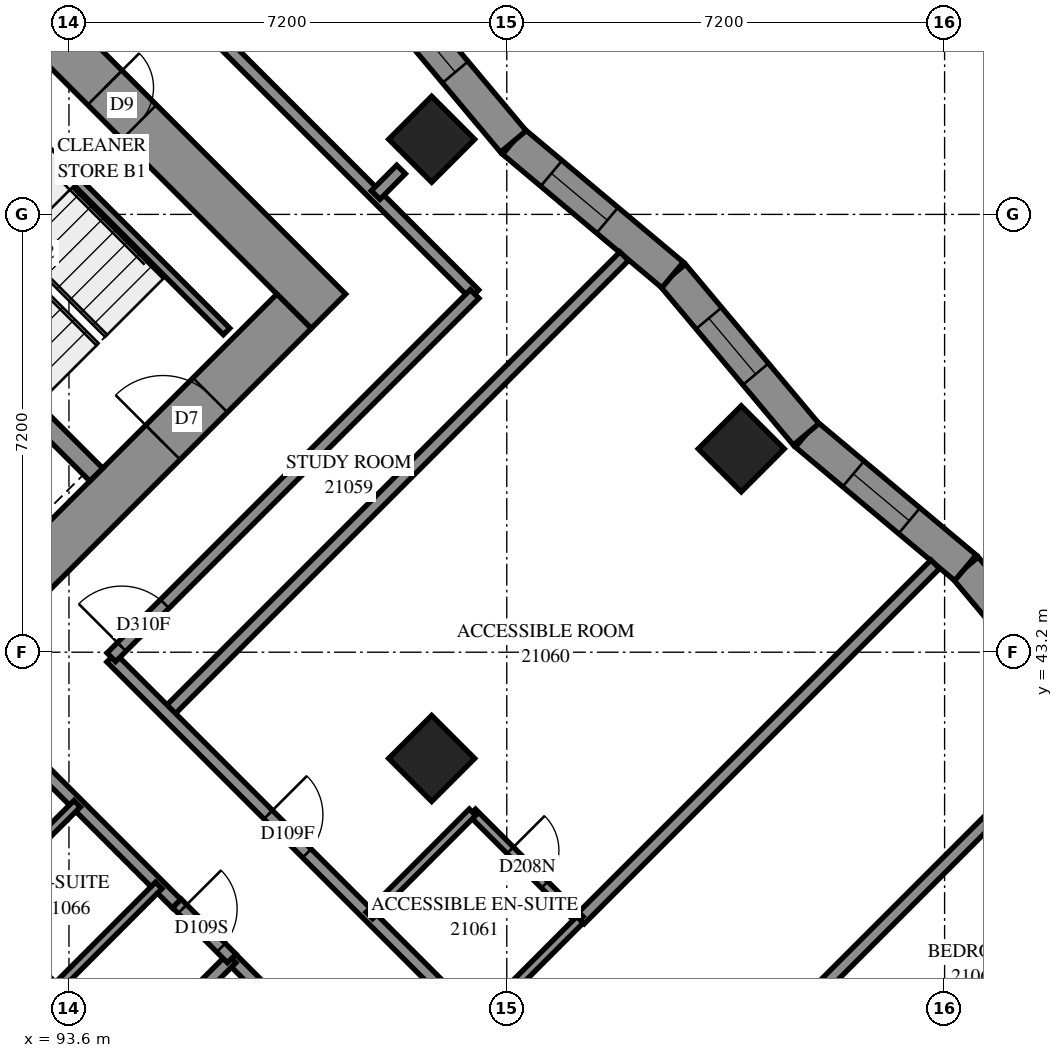
"""IFC4 building model, lengths in metres.
Left out: names, types, materials, properties, quantities, classifications, styles, units other than length and angle.
Written with IfcOpenShell. Run it as: python <this file> out.ifc"""

import sys

from ifc_helpers import new_model, si_unit, direction, frame, frame_2d, origin, origin_2d, place, context, subcontext, project, spatial, polyline, rectangle, outline, extrude, element, fill, save


model = new_model("IFC4")
c1 = context("Model", 3, precision=1e-05, world=origin(), true_north=direction((0.0, 1.0)))
c2 = subcontext(c1, "Body", "Model", "MODEL_VIEW")
j1 = project(units=[si_unit("LENGTHUNIT", "METRE"), si_unit("PLANEANGLEUNIT", "RADIAN")], contexts=[c1])
p1 = place(None, origin())
s1 = spatial("IfcSite", under=j1, at=p1, CompositionType="ELEMENT")
p2 = place(p1, origin())
s2 = spatial("IfcBuilding", under=s1, at=p2, CompositionType="ELEMENT")
p3 = place(p2, frame((0.0, 0.0, 81.2)))
s3 = spatial("IfcBuildingStorey", under=s2, at=p3, CompositionType="ELEMENT", Elevation=81.2)
for number, where, z_axis, x_axis in (
    (1, (99.565, 51.635, 0.0), (0.0, 0.0, 1.0), (0.707, -0.707, 0.0)),
    (2, (104.656, 46.544, 0.0), (0.0, 0.0, 1.0), (0.707, -0.707, 0.0)),
    (3, (99.565, 41.453, 0.0), (0.0, 0.0, 1.0), (0.707, -0.707, 0.0)),
):
    element("IfcColumn", number, at=place(p3, frame(where, z_axis=z_axis, x_axis=x_axis)), inside=s3, PredefinedType="COLUMN", context=c2, shape_type="SweptSolid", body=[
        extrude(rectangle(XDim=1.0, YDim=1.0, at=origin_2d()), origin(), (0.0, 0.0, 1.0), 3.1),
    ])
p4 = place(p3, frame((86.554, 60.121, -0.3), z_axis=(0.0, 0.0, 1.0), x_axis=(0.7071067812, -0.7071067812, 0.0)))
e4 = element("IfcWall", 4, at=p4, inside=s3, PredefinedType="SHEAR", context=c2, shape_type="SweptSolid", body=[
    extrude(rectangle(XDim=16.0, YDim=0.8, at=frame_2d((8.0, 0.0))), origin(), (0.0, 0.0, 1.0), 2.7),
])
p5 = place(p4, frame((10.8, 0.0, 0.3)))
e5 = element("IfcOpeningElement", 5, at=p5, cuts=e4, PredefinedType="OPENING", context=c2, shape_type="SweptSolid", body=[
    extrude(rectangle(XDim=0.8, YDim=2.1, at=frame_2d((0.4, 1.05))), frame((0.0, 0.41, 0.0), z_axis=(0.0, -1.0, 0.0), x_axis=(1.0, 0.0, 0.0)), (0.0, 0.0, 1.0), 0.82),
])
p6 = place(p3, frame((87.12, 38.625, -0.3), z_axis=(0.0, 0.0, 1.0), x_axis=(0.7071067812, 0.7071067812, 0.0)))
e6 = element("IfcWall", 6, at=p6, inside=s3, PredefinedType="SHEAR", context=c2, shape_type="SweptSolid", body=[
    extrude(rectangle(XDim=14.4, YDim=0.8, at=frame_2d((7.2, 0.0))), origin(), (0.0, 0.0, 1.0), 2.7),
])
p7 = place(p6, frame((4.55, 0.0, 0.3)))
e7 = element("IfcOpeningElement", 7, at=p7, cuts=e6, PredefinedType="OPENING", context=c2, shape_type="SweptSolid", body=[
    extrude(rectangle(XDim=1.1, YDim=2.1, at=frame_2d((0.55, 1.05))), frame((0.0, 0.41, 0.0), z_axis=(0.0, -1.0, 0.0), x_axis=(1.0, 0.0, 0.0)), (0.0, 0.0, 1.0), 0.82),
])
p8 = place(p6, frame((11.35, 0.0, 0.3)))
e8 = element("IfcOpeningElement", 8, at=p8, cuts=e6, PredefinedType="OPENING", context=c2, shape_type="SweptSolid", body=[
    extrude(rectangle(XDim=1.1, YDim=2.1, at=frame_2d((0.55, 1.05))), frame((0.0, 0.41, 0.0), z_axis=(0.0, -1.0, 0.0), x_axis=(1.0, 0.0, 0.0)), (0.0, 0.0, 1.0), 0.82),
])
p9 = place(p3, frame((88.958, 51.211, 0.0), z_axis=(0.0, 0.0, 1.0), x_axis=(0.7070998367, -0.7071137256, 0.0)))
e9 = element("IfcWall", 9, at=p9, inside=s3, PredefinedType="SOLIDWALL", context=c2, shape_type="SweptSolid", body=[
    extrude(rectangle(XDim=7.2, YDim=0.3, at=frame_2d((3.6, 0.0))), origin(), (0.0, 0.0, 1.0), 3.1),
])
p10 = place(p3, frame((110.553, 41.95, 0.0), z_axis=(0.0, 0.0, 1.0), x_axis=(-0.6423052098, 0.766448966, 0.0)))
e10 = element("IfcWall", 10, at=p10, inside=s3, PredefinedType="SOLIDWALL", context=c2, shape_type="SweptSolid", body=[
    extrude(outline(polyline([(0.048, -0.275), (3.466, -0.275), (3.418, 0.275), (-0.048, 0.275), (0.048, -0.275)])), origin(), (0.0, 0.0, 1.0), 3.1),
])
p11 = place(p10, frame((1.109, 0.0, 0.5)))
e11 = element("IfcOpeningElement", 11, at=p11, cuts=e10, PredefinedType="OPENING", context=c2, shape_type="SweptSolid", body=[
    extrude(rectangle(XDim=1.2, YDim=2.45, at=frame_2d((0.6, 1.225))), frame((0.0, 0.285, 0.0), z_axis=(0.0, -1.0, 0.0), x_axis=(1.0, 0.0, 0.0)), (0.0, 0.0, 1.0), 0.57),
])
p12 = place(p3, frame((108.343, 44.588, 0.0), z_axis=(0.0, 0.0, 1.0), x_axis=(-0.7664414628, 0.6423141631, 0.0)))
e12 = element("IfcWall", 12, at=p12, inside=s3, PredefinedType="SOLIDWALL", context=c2, shape_type="SweptSolid", body=[
    extrude(outline(polyline([(-0.024, -0.275), (3.394, -0.275), (3.442, 0.275), (0.024, 0.275), (-0.024, -0.275)])), origin(), (0.0, 0.0, 1.0), 3.1),
])
p13 = place(p12, frame((1.205, 0.0, 0.5)))
e13 = element("IfcOpeningElement", 13, at=p13, cuts=e12, PredefinedType="OPENING", context=c2, shape_type="SweptSolid", body=[
    extrude(rectangle(XDim=1.2, YDim=2.45, at=frame_2d((0.6, 1.225))), frame((0.0, 0.285, 0.0), z_axis=(0.0, -1.0, 0.0), x_axis=(1.0, 0.0, 0.0)), (0.0, 0.0, 1.0), 0.57),
])
p14 = place(p3, frame((105.723, 46.784, 0.0), z_axis=(0.0, 0.0, 1.0), x_axis=(-0.6423113798, 0.7664437954, 0.0)))
e14 = element("IfcWall", 14, at=p14, inside=s3, PredefinedType="SOLIDWALL", context=c2, shape_type="SweptSolid", body=[
    extrude(outline(polyline([(0.024, -0.275), (3.442, -0.275), (3.394, 0.275), (-0.024, 0.275), (0.024, -0.275)])), origin(), (0.0, 0.0, 1.0), 3.1),
])
p15 = place(p14, frame((1.291, 0.0, 0.5)))
e15 = element("IfcOpeningElement", 15, at=p15, cuts=e14, PredefinedType="OPENING", context=c2, shape_type="SweptSolid", body=[
    extrude(rectangle(XDim=1.2, YDim=2.45, at=frame_2d((0.6, 1.225))), frame((0.0, 0.285, 0.0), z_axis=(0.0, -1.0, 0.0), x_axis=(1.0, 0.0, 0.0)), (0.0, 0.0, 1.0), 0.57),
])
p16 = place(p3, frame((103.527, 49.404, 0.0), z_axis=(0.0, 0.0, 1.0), x_axis=(-0.7664293929, 0.6423285652, 0.0)))
e16 = element("IfcWall", 16, at=p16, inside=s3, PredefinedType="SOLIDWALL", context=c2, shape_type="SweptSolid", body=[
    extrude(outline(polyline([(-0.024, -0.275), (3.394, -0.275), (3.442, 0.275), (0.024, 0.275), (-0.024, -0.275)])), origin(), (0.0, 0.0, 1.0), 3.1),
])
p17 = place(p16, frame((1.401, 0.0, 0.5)))
e17 = element("IfcOpeningElement", 17, at=p17, cuts=e16, PredefinedType="OPENING", context=c2, shape_type="SweptSolid", body=[
    extrude(rectangle(XDim=1.2, YDim=2.45, at=frame_2d((0.6, 1.225))), frame((0.0, 0.285, 0.0), z_axis=(0.0, -1.0, 0.0), x_axis=(1.0, 0.0, 0.0)), (0.0, 0.0, 1.0), 0.57),
])
p18 = place(p3, frame((100.907, 51.599, 0.0), z_axis=(0.0, 0.0, 1.0), x_axis=(-0.6423285652, 0.7664293929, 0.0)))
e18 = element("IfcWall", 18, at=p18, inside=s3, PredefinedType="SOLIDWALL", context=c2, shape_type="SweptSolid", body=[
    extrude(outline(polyline([(0.024, -0.275), (3.442, -0.275), (3.394, 0.275), (-0.024, 0.275), (0.024, -0.275)])), origin(), (0.0, 0.0, 1.0), 3.1),
])
p19 = place(p18, frame((1.486, 0.0, 0.5)))
e19 = element("IfcOpeningElement", 19, at=p19, cuts=e18, PredefinedType="OPENING", context=c2, shape_type="SweptSolid", body=[
    extrude(rectangle(XDim=1.2, YDim=2.45, at=frame_2d((0.6, 1.225))), frame((0.0, 0.285, 0.0), z_axis=(0.0, -1.0, 0.0), x_axis=(1.0, 0.0, 0.0)), (0.0, 0.0, 1.0), 0.57),
])
p20 = place(p3, frame((91.313, 53.354, 0.0), z_axis=(0.0, 0.0, 1.0), x_axis=(0.7071140275, -0.7070995348, 0.0)))
e20 = element("IfcWall", 20, at=p20, inside=s3, PredefinedType="PARTITIONING", context=c2, shape_type="SweptSolid", body=[
    extrude(rectangle(XDim=6.9, YDim=0.15, at=frame_2d((3.45, 0.0))), origin(), (0.0, 0.0, 1.0), 3.1),
])
p21 = place(p3, frame((87.894, 61.461, 0.0), z_axis=(0.0, 0.0, 1.0), x_axis=(0.7071067812, -0.7071067812, 0.0)))
e21 = element("IfcWall", 21, at=p21, inside=s3, PredefinedType="PARTITIONING", context=c2, shape_type="SweptSolid", body=[
    extrude(rectangle(XDim=17.5, YDim=0.2, at=frame_2d((8.75, 0.0))), origin(), (0.0, 0.0, 1.0), 3.1),
])
p22 = place(p21, frame((8.735, 0.0, 0.0)))
e22 = element("IfcOpeningElement", 22, at=p22, cuts=e21, PredefinedType="OPENING", context=c2, shape_type="SweptSolid", body=[
    extrude(rectangle(XDim=0.9, YDim=2.1, at=frame_2d((0.45, 1.05))), frame((0.0, 0.11, 0.0), z_axis=(0.0, -1.0, 0.0), x_axis=(1.0, 0.0, 0.0)), (0.0, 0.0, 1.0), 0.22),
])
p23 = place(p3, frame((95.215, 42.197, 0.0), z_axis=(0.0, 0.0, 1.0), x_axis=(0.7071114855, 0.7071020769, 0.0)))
e23 = element("IfcWall", 23, at=p23, inside=s3, PredefinedType="PARTITIONING", context=c2, shape_type="SweptSolid", body=[
    extrude(rectangle(XDim=10.629, YDim=0.2, at=frame_2d((5.314, 0.0))), origin(), (0.0, 0.0, 1.0), 3.1),
])
p24 = place(p3, frame((94.294, 43.111, 0.0), z_axis=(0.0, 0.0, 1.0), x_axis=(0.7071067812, -0.7071067812, 0.0)))
e24 = element("IfcWall", 24, at=p24, inside=s3, PredefinedType="PARTITIONING", context=c2, shape_type="SweptSolid", body=[
    extrude(rectangle(XDim=8.499, YDim=0.2, at=frame_2d((4.25, 0.0))), origin(), (0.0, 0.0, 1.0), 3.1),
])
p25 = place(p24, frame((3.651, 0.0, 0.0)))
e25 = element("IfcOpeningElement", 25, at=p25, cuts=e24, PredefinedType="OPENING", context=c2, shape_type="SweptSolid", body=[
    extrude(rectangle(XDim=0.9, YDim=2.1, at=frame_2d((0.45, 1.05))), frame((0.0, 0.11, 0.0), z_axis=(0.0, -1.0, 0.0), x_axis=(1.0, 0.0, 0.0)), (0.0, 0.0, 1.0), 0.22),
])
p26 = place(p3, frame((94.297, 43.117, 0.0), z_axis=(0.0, 0.0, 1.0), x_axis=(0.7071067812, 0.7071067812, 0.0)))
e26 = element("IfcWall", 26, at=p26, inside=s3, PredefinedType="PARTITIONING", context=c2, shape_type="SweptSolid", body=[
    extrude(rectangle(XDim=8.448, YDim=0.2, at=frame_2d((4.224, 0.0))), origin(), (0.0, 0.0, 1.0), 3.1),
])
p27 = place(p26, frame((0.242, 0.0, 0.0)))
e27 = element("IfcOpeningElement", 27, at=p27, cuts=e26, PredefinedType="OPENING", context=c2, shape_type="SweptSolid", body=[
    extrude(rectangle(XDim=1.0, YDim=2.1, at=frame_2d((0.5, 1.05))), frame((0.0, 0.11, 0.0), z_axis=(0.0, -1.0, 0.0), x_axis=(1.0, 0.0, 0.0)), (0.0, 0.0, 1.0), 0.22),
])
p28 = place(p3, frame((102.002, 38.804, 0.0), z_axis=(0.0, 0.0, 1.0), x_axis=(0.7072398927, 0.7069736446, 0.0)))
e28 = element("IfcWall", 28, at=p28, inside=s3, PredefinedType="PARTITIONING", context=c2, shape_type="SweptSolid", body=[
    extrude(rectangle(XDim=8.263, YDim=0.2, at=frame_2d((4.131, 0.0))), origin(), (0.0, 0.0, 1.0), 3.1),
])
p29 = place(p3, frame((105.155, 36.863, 0.0), z_axis=(0.0, 0.0, 1.0), x_axis=(0.7071067812, 0.7071067812, 0.0)))
e29 = element("IfcWall", 29, at=p29, inside=s3, PredefinedType="PARTITIONING", context=c2, shape_type="SweptSolid", body=[
    extrude(rectangle(XDim=5.787, YDim=0.2, at=frame_2d((2.893, 0.0))), origin(), (0.0, 0.0, 1.0), 3.1),
])
p30 = place(p3, frame((92.809, 41.627, 0.0), z_axis=(0.0, 0.0, 1.0), x_axis=(0.7071067812, -0.7071067812, 0.0)))
e30 = element("IfcWall", 30, at=p30, inside=s3, PredefinedType="PARTITIONING", context=c2, shape_type="SweptSolid", body=[
    extrude(rectangle(XDim=3.623, YDim=0.2, at=frame_2d((1.812, 0.0))), origin(), (0.0, 0.0, 1.0), 3.1),
])
p31 = place(p3, frame((96.274, 38.162, 0.0), z_axis=(0.0, 0.0, 1.0), x_axis=(0.7071067812, -0.7071067812, 0.0)))
e31 = element("IfcWall", 31, at=p31, inside=s3, PredefinedType="PARTITIONING", context=c2, shape_type="SweptSolid", body=[
    extrude(rectangle(XDim=3.1, YDim=0.2, at=frame_2d((1.55, 0.0))), origin(), (0.0, 0.0, 1.0), 3.1),
])
p32 = place(p3, frame((100.233, 40.567, 0.0), z_axis=(0.0, 0.0, 1.0), x_axis=(0.7071067812, -0.7071067812, 0.0)))
e32 = element("IfcWall", 32, at=p32, inside=s3, PredefinedType="PARTITIONING", context=c2, shape_type="SweptSolid", body=[
    extrude(rectangle(XDim=2.5, YDim=0.15, at=frame_2d((1.25, 0.0))), origin(), (0.0, 0.0, 1.0), 3.1),
])
p33 = place(p32, frame((0.883, 0.0, 0.0)))
e33 = element("IfcOpeningElement", 33, at=p33, cuts=e32, PredefinedType="OPENING", context=c2, shape_type="SweptSolid", body=[
    extrude(rectangle(XDim=0.8, YDim=2.1, at=frame_2d((0.4, 1.05))), frame((0.0, 0.085, 0.0), z_axis=(0.0, -1.0, 0.0), x_axis=(1.0, 0.0, 0.0)), (0.0, 0.0, 1.0), 0.17),
])
for number, where, z_axis, x_axis in (
    (34, (92.037, 39.011, 0.0), (0.0, 0.0, 1.0), (0.708, 0.707, 0.0)),
    (35, (93.381, 37.667, 0.0), (0.0, 0.0, 1.0), (0.707, 0.708, 0.0)),
    (36, (98.541, 38.871, 0.0), (0.0, 0.0, 1.0), (0.707, 0.708, 0.0)),
    (37, (100.308, 37.103, 0.0), (0.0, 0.0, 1.0), (0.707, 0.708, 0.0)),
):
    element("IfcWall", number, at=place(p3, frame(where, z_axis=z_axis, x_axis=x_axis)), inside=s3, PredefinedType="PARTITIONING", context=c2, shape_type="SweptSolid", body=[
        extrude(rectangle(XDim=2.4, YDim=0.15, at=frame_2d((1.2, 0.0))), origin(), (0.0, 0.0, 1.0), 3.1),
    ])
p34 = place(p3, frame((92.031, 39.011, 0.0), z_axis=(0.0, 0.0, 1.0), x_axis=(0.7071067812, -0.7071067812, 0.0)))
e38 = element("IfcWall", 38, at=p34, inside=s3, PredefinedType="PARTITIONING", context=c2, shape_type="SweptSolid", body=[
    extrude(rectangle(XDim=1.901, YDim=0.15, at=frame_2d((0.95, 0.0))), origin(), (0.0, 0.0, 1.0), 3.1),
])
p35 = place(p34, frame((0.502, 0.0, 0.0)))
e39 = element("IfcOpeningElement", 39, at=p35, cuts=e38, PredefinedType="OPENING", context=c2, shape_type="SweptSolid", body=[
    extrude(rectangle(XDim=0.8, YDim=2.1, at=frame_2d((0.4, 1.05))), frame((0.0, 0.085, 0.0), z_axis=(0.0, -1.0, 0.0), x_axis=(1.0, 0.0, 0.0)), (0.0, 0.0, 1.0), 0.17),
])
p36 = place(p3, frame((94.973, 36.863, 0.0), z_axis=(0.0, 0.0, 1.0), x_axis=(0.7071067812, 0.7071067812, 0.0)))
e40 = element("IfcWall", 40, at=p36, inside=s3, PredefinedType="PARTITIONING", context=c2, shape_type="SweptSolid", body=[
    extrude(rectangle(XDim=1.841, YDim=0.2, at=frame_2d((0.921, 0.0))), origin(), (0.0, 0.0, 1.0), 3.1),
])
p37 = place(p3, frame((95.375, 39.069, 0.0), z_axis=(0.0, 0.0, 1.0), x_axis=(0.7063232841, -0.7078894111, 0.0)))
e41 = element("IfcWall", 41, at=p37, inside=s3, PredefinedType="PARTITIONING", context=c2, shape_type="SweptSolid", body=[
    extrude(rectangle(XDim=1.277, YDim=0.2, at=frame_2d((0.638, 0.0))), origin(), (0.0, 0.0, 1.0), 3.1),
])
p38 = place(p37, frame((0.129, 0.0, 0.0)))
e42 = element("IfcOpeningElement", 42, at=p38, cuts=e41, PredefinedType="OPENING", context=c2, shape_type="SweptSolid", body=[
    extrude(rectangle(XDim=0.9, YDim=2.1, at=frame_2d((0.45, 1.05))), frame((0.0, 0.11, 0.0), z_axis=(0.0, -1.0, 0.0), x_axis=(1.0, 0.0, 0.0)), (0.0, 0.0, 1.0), 0.22),
])
p39 = place(p3, frame((98.644, 50.718, 0.0), z_axis=(0.0, 0.0, 1.0), x_axis=(0.7054171665, 0.7087923682, 0.0)))
e43 = element("IfcWall", 43, at=p39, inside=s3, PredefinedType="PARTITIONING", context=c2, shape_type="SweptSolid", body=[
    extrude(rectangle(XDim=0.593, YDim=0.2, at=frame_2d((0.296, 0.0))), origin(), (0.0, 0.0, 1.0), 3.1),
])
p40 = place(p13, origin())
e44 = element("IfcWindow", 44, at=p40, inside=s3, PartitioningType="SINGLE_PANEL", PredefinedType="WINDOW", context=c2, shape_type="SweptSolid", body=[
    extrude(rectangle(XDim=1.2, YDim=2.45, at=frame_2d((0.6, 1.225))), frame((0.0, 0.155, 0.0), z_axis=(0.0, -1.0, 0.0), x_axis=(1.0, 0.0, 0.0)), (0.0, 0.0, 1.0), 0.06),
])
fill(e13, e44)
p41 = place(p15, origin())
e45 = element("IfcWindow", 45, at=p41, inside=s3, PartitioningType="SINGLE_PANEL", PredefinedType="WINDOW", context=c2, shape_type="SweptSolid", body=[
    extrude(rectangle(XDim=1.2, YDim=2.45, at=frame_2d((0.6, 1.225))), frame((0.0, 0.155, 0.0), z_axis=(0.0, -1.0, 0.0), x_axis=(1.0, 0.0, 0.0)), (0.0, 0.0, 1.0), 0.06),
])
fill(e15, e45)
p42 = place(p17, origin())
e46 = element("IfcWindow", 46, at=p42, inside=s3, PartitioningType="SINGLE_PANEL", PredefinedType="WINDOW", context=c2, shape_type="SweptSolid", body=[
    extrude(rectangle(XDim=1.2, YDim=2.45, at=frame_2d((0.6, 1.225))), frame((0.0, 0.155, 0.0), z_axis=(0.0, -1.0, 0.0), x_axis=(1.0, 0.0, 0.0)), (0.0, 0.0, 1.0), 0.06),
])
fill(e17, e46)
p43 = place(p19, origin())
e47 = element("IfcWindow", 47, at=p43, inside=s3, PartitioningType="SINGLE_PANEL", PredefinedType="WINDOW", context=c2, shape_type="SweptSolid", body=[
    extrude(rectangle(XDim=1.2, YDim=2.45, at=frame_2d((0.6, 1.225))), frame((0.0, 0.155, 0.0), z_axis=(0.0, -1.0, 0.0), x_axis=(1.0, 0.0, 0.0)), (0.0, 0.0, 1.0), 0.06),
])
fill(e19, e47)
p44 = place(p5, origin())
e48 = element("IfcDoor", 48, at=p44, inside=s3, OperationType="SINGLE_SWING_RIGHT", PredefinedType="DOOR", context=c2, shape_type="SweptSolid", body=[
    extrude(rectangle(XDim=0.8, YDim=2.1, at=frame_2d((0.4, 1.05))), frame((0.0, -0.34, 0.0), z_axis=(0.0, -1.0, 0.0), x_axis=(1.0, 0.0, 0.0)), (0.0, 0.0, 1.0), 0.05),
])
fill(e5, e48)
p45 = place(p8, origin())
e49 = element("IfcDoor", 49, at=p45, inside=s3, OperationType="SINGLE_SWING_RIGHT", PredefinedType="DOOR", context=c2, shape_type="SweptSolid", body=[
    extrude(rectangle(XDim=1.1, YDim=2.1, at=frame_2d((0.55, 1.05))), frame((0.0, 0.025, 0.0), z_axis=(0.0, -1.0, 0.0), x_axis=(1.0, 0.0, 0.0)), (0.0, 0.0, 1.0), 0.05),
])
fill(e8, e49)
p46 = place(p27, origin())
e50 = element("IfcDoor", 50, at=p46, inside=s3, OperationType="SINGLE_SWING_LEFT", PredefinedType="DOOR", context=c2, shape_type="SweptSolid", body=[
    extrude(rectangle(XDim=1.0, YDim=2.1, at=frame_2d((0.5, 1.05))), frame((0.0, 0.025, 0.0), z_axis=(0.0, -1.0, 0.0), x_axis=(1.0, 0.0, 0.0)), (0.0, 0.0, 1.0), 0.05),
])
fill(e27, e50)
p47 = place(p25, origin())
e51 = element("IfcDoor", 51, at=p47, inside=s3, OperationType="SINGLE_SWING_RIGHT", PredefinedType="DOOR", context=c2, shape_type="SweptSolid", body=[
    extrude(rectangle(XDim=0.9, YDim=2.1, at=frame_2d((0.45, 1.05))), frame((0.0, 0.025, 0.0), z_axis=(0.0, -1.0, 0.0), x_axis=(1.0, 0.0, 0.0)), (0.0, 0.0, 1.0), 0.05),
])
fill(e25, e51)
p48 = place(p33, origin())
e52 = element("IfcDoor", 52, at=p48, inside=s3, OperationType="SINGLE_SWING_RIGHT", PredefinedType="DOOR", context=c2, shape_type="SweptSolid", body=[
    extrude(rectangle(XDim=0.8, YDim=2.1, at=frame_2d((0.4, 1.05))), frame((0.0, 0.025, 0.0), z_axis=(0.0, -1.0, 0.0), x_axis=(1.0, 0.0, 0.0)), (0.0, 0.0, 1.0), 0.05),
])
fill(e33, e52)
p49 = place(p38, origin())
e53 = element("IfcDoor", 53, at=p49, inside=s3, OperationType="SINGLE_SWING_LEFT", PredefinedType="DOOR", context=c2, shape_type="SweptSolid", body=[
    extrude(rectangle(XDim=0.9, YDim=2.1, at=frame_2d((0.45, 1.05))), frame((0.0, 0.025, 0.0), z_axis=(0.0, -1.0, 0.0), x_axis=(1.0, 0.0, 0.0)), (0.0, 0.0, 1.0), 0.05),
])
fill(e42, e53)
save(model, sys.argv[1])
